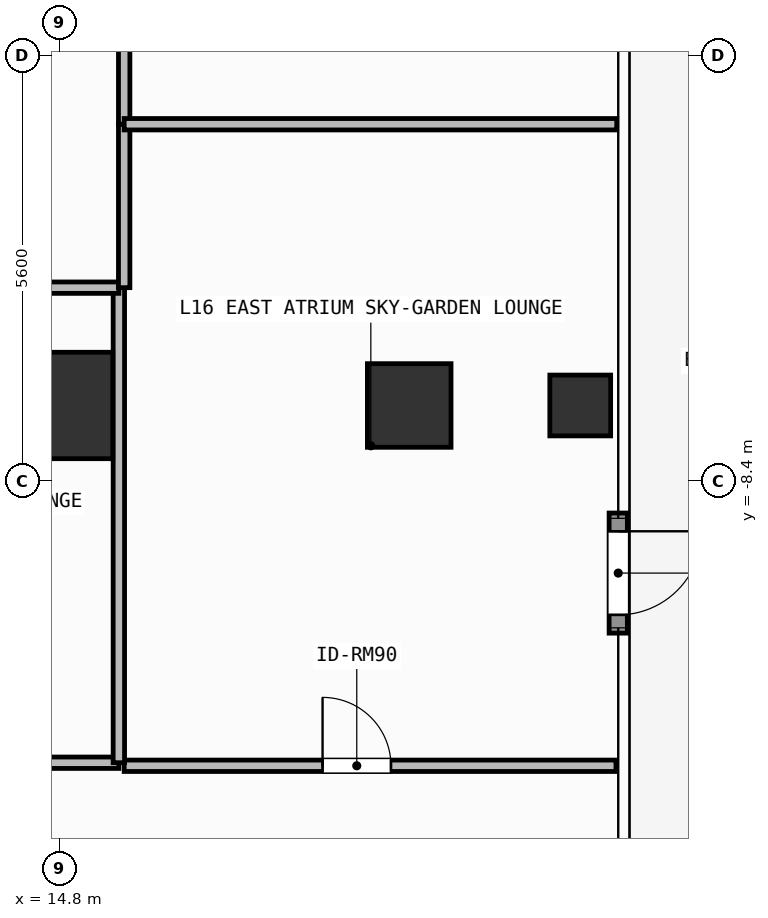
"""IFC4 building model, lengths in metres.
Left out: names, types, materials, properties, quantities, classifications, styles, units other than length and angle.
Written with IfcOpenShell. Run it as: python <this file> out.ifc"""

import sys

from ifc_helpers import new_model, si_unit, direction, frame, frame_2d, origin, origin_2d, place, context, subcontext, project, spatial, rectangle, hollow_rectangle, extrude, element, fill, save


model = new_model("IFC4")
c1 = context("Model", 3, precision=1e-05, world=origin(), true_north=direction((0.0, 1.0)))
c2 = subcontext(c1, "Body", "Model", "MODEL_VIEW")
j1 = project(units=[si_unit("LENGTHUNIT", "METRE"), si_unit("PLANEANGLEUNIT", "RADIAN")], contexts=[c1])
p1 = place(None, origin())
s1 = spatial("IfcSite", under=j1, at=p1, CompositionType="ELEMENT")
p2 = place(p1, origin())
s2 = spatial("IfcBuilding", under=s1, at=p2, CompositionType="ELEMENT")
p3 = place(p2, frame((0.0, 0.0, 61.8)))
s3 = spatial("IfcBuildingStorey", under=s2, at=p3, CompositionType="ELEMENT", Elevation=61.8)
p4 = place(p3, frame((14.8, -7.4, 0.0), z_axis=(0.0, 0.0, 1.0), x_axis=(1.0, 0.0, 0.0)))
e1 = element("IfcColumn", 1, at=p4, inside=s3, PredefinedType="COLUMN", context=c2, shape_type="SweptSolid", body=[
    extrude(rectangle(XDim=1.4, YDim=1.4, at=origin_2d()), origin(), (0.0, 0.0, 1.0), 3.9),
])
p5 = place(p3, frame((19.4, -7.4, 0.0), z_axis=(0.0, 0.0, 1.0), x_axis=(1.0, 0.0, 0.0)))
e2 = element("IfcColumn", 2, at=p5, inside=s3, PredefinedType="COLUMN", context=c2, shape_type="SweptSolid", body=[
    extrude(rectangle(XDim=1.1, YDim=1.1, at=origin_2d()), origin(), (0.0, 0.0, 1.0), 3.9),
])
p6 = place(p3, frame((21.65, -7.4, 0.0), z_axis=(0.0, 0.0, 1.0), x_axis=(1.0, 0.0, 0.0)))
e3 = element("IfcColumn", 3, at=p6, inside=s3, PredefinedType="COLUMN", context=c2, shape_type="SweptSolid", body=[
    extrude(hollow_rectangle(XDim=0.8, YDim=0.8, WallThickness=0.036, at=origin_2d()), origin(), (0.0, 0.0, 1.0), 3.9),
])
p7 = place(p3, frame((22.15, -8.815, 0.0), z_axis=(0.0, 0.0, 1.0), x_axis=(0.0, -1.0, 0.0)))
e4 = element("IfcWall", 4, at=p7, inside=s3, PredefinedType="SOLIDWALL", context=c2, shape_type="SweptSolid", body=[
    extrude(rectangle(XDim=1.58, YDim=0.24, at=frame_2d((0.79, 0.0))), origin(), (0.0, 0.0, 1.0), 3.68),
])
p8 = place(p7, frame((0.24, 0.0, 0.0)))
e5 = element("IfcOpeningElement", 5, at=p8, cuts=e4, PredefinedType="OPENING", context=c2, shape_type="SweptSolid", body=[
    extrude(rectangle(XDim=1.1, YDim=2.2, at=frame_2d((0.55, 1.1))), frame((0.0, 0.13, 0.0), z_axis=(0.0, -1.0, 0.0), x_axis=(1.0, 0.0, 0.0)), (0.0, 0.0, 1.0), 0.26),
])
p9 = place(p3, frame((10.1, -12.1, 0.0), z_axis=(0.0, 0.0, 1.0), x_axis=(1.0, 0.0, 0.0)))
e6 = element("IfcWall", 6, at=p9, inside=s3, PredefinedType="PARTITIONING", context=c2, shape_type="SweptSolid", body=[
    extrude(rectangle(XDim=5.48, YDim=0.15, at=frame_2d((2.74, 0.0))), origin(), (0.0, 0.0, 1.0), 3.68),
])
p10 = place(p9, frame((2.29, 0.0, 0.0)))
e7 = element("IfcOpeningElement", 7, at=p10, cuts=e6, PredefinedType="OPENING", context=c2, shape_type="SweptSolid", body=[
    extrude(rectangle(XDim=0.9, YDim=2.1, at=frame_2d((0.45, 1.05))), frame((0.0, 0.085, 0.0), z_axis=(0.0, -1.0, 0.0), x_axis=(1.0, 0.0, 0.0)), (0.0, 0.0, 1.0), 0.17),
])
p11 = place(p3, frame((15.65, -12.14, 0.0), z_axis=(0.0, 0.0, 1.0), x_axis=(1.0, 0.0, 0.0)))
e8 = element("IfcWall", 8, at=p11, inside=s3, PredefinedType="PARTITIONING", context=c2, shape_type="SweptSolid", body=[
    extrude(rectangle(XDim=6.47, YDim=0.15, at=frame_2d((3.235, 0.0))), origin(), (0.0, 0.0, 1.0), 3.68),
])
p12 = place(p11, frame((2.61, 0.0, 0.0)))
e9 = element("IfcOpeningElement", 9, at=p12, cuts=e8, PredefinedType="OPENING", context=c2, shape_type="SweptSolid", body=[
    extrude(rectangle(XDim=0.9, YDim=2.1, at=frame_2d((0.45, 1.05))), frame((0.0, 0.085, 0.0), z_axis=(0.0, -1.0, 0.0), x_axis=(1.0, 0.0, 0.0)), (0.0, 0.0, 1.0), 0.17),
])
p13 = place(p3, frame((15.58, -12.1, 0.0), z_axis=(0.0, 0.0, 1.0), x_axis=(0.0, 1.0, 0.0)))
e10 = element("IfcWall", 10, at=p13, inside=s3, PredefinedType="PARTITIONING", context=c2, shape_type="SweptSolid", body=[
    extrude(rectangle(XDim=6.25, YDim=0.15, at=frame_2d((3.125, 0.0))), origin(), (0.0, 0.0, 1.0), 3.68),
])
p14 = place(p3, frame((8.96, -5.85, 0.0), z_axis=(0.0, 0.0, 1.0), x_axis=(1.0, 0.0, 0.0)))
e11 = element("IfcWall", 11, at=p14, inside=s3, PredefinedType="PARTITIONING", context=c2, shape_type="SweptSolid", body=[
    extrude(rectangle(XDim=6.62, YDim=0.15, at=frame_2d((3.31, 0.0))), origin(), (0.0, 0.0, 1.0), 3.68),
])
p15 = place(p3, frame((15.65, -5.85, 0.0), z_axis=(0.0, 0.0, 1.0), x_axis=(0.0, 1.0, 0.0)))
e12 = element("IfcWall", 12, at=p15, inside=s3, PredefinedType="PARTITIONING", context=c2, shape_type="SweptSolid", body=[
    extrude(rectangle(XDim=2.15, YDim=0.15, at=frame_2d((1.075, 0.0))), origin(), (0.0, 0.0, 1.0), 3.68),
])
p16 = place(p3, frame((15.65, -3.7, 0.0), z_axis=(0.0, 0.0, 1.0), x_axis=(0.0, 1.0, 0.0)))
e13 = element("IfcWall", 13, at=p16, inside=s3, PredefinedType="PARTITIONING", context=c2, shape_type="SweptSolid", body=[
    extrude(rectangle(XDim=9.55, YDim=0.15, at=frame_2d((4.775, 0.0))), origin(), (0.0, 0.0, 1.0), 3.68),
])
p17 = place(p3, frame((15.65, -3.7, 0.0), z_axis=(0.0, 0.0, 1.0), x_axis=(1.0, 0.0, 0.0)))
e14 = element("IfcWall", 14, at=p17, inside=s3, PredefinedType="PARTITIONING", context=c2, shape_type="SweptSolid", body=[
    extrude(rectangle(XDim=6.48, YDim=0.15, at=frame_2d((3.24, 0.0))), origin(), (0.0, 0.0, 1.0), 3.68),
])
p18 = place(p8, origin())
e15 = element("IfcDoor", 15, at=p18, inside=s3, OperationType="SINGLE_SWING_LEFT", PredefinedType="DOOR", context=c2, shape_type="SweptSolid", body=[
    extrude(rectangle(XDim=1.1, YDim=2.2, at=frame_2d((0.55, 1.1))), frame((0.0, 0.025, 0.0), z_axis=(0.0, -1.0, 0.0), x_axis=(1.0, 0.0, 0.0)), (0.0, 0.0, 1.0), 0.05),
])
fill(e5, e15)
p19 = place(p12, origin())
e16 = element("IfcDoor", 16, at=p19, inside=s3, OperationType="SINGLE_SWING_LEFT", PredefinedType="DOOR", context=c2, shape_type="SweptSolid", body=[
    extrude(rectangle(XDim=0.9, YDim=2.1, at=frame_2d((0.45, 1.05))), frame((0.0, 0.025, 0.0), z_axis=(0.0, -1.0, 0.0), x_axis=(1.0, 0.0, 0.0)), (0.0, 0.0, 1.0), 0.05),
])
fill(e9, e16)
save(model, sys.argv[1])
